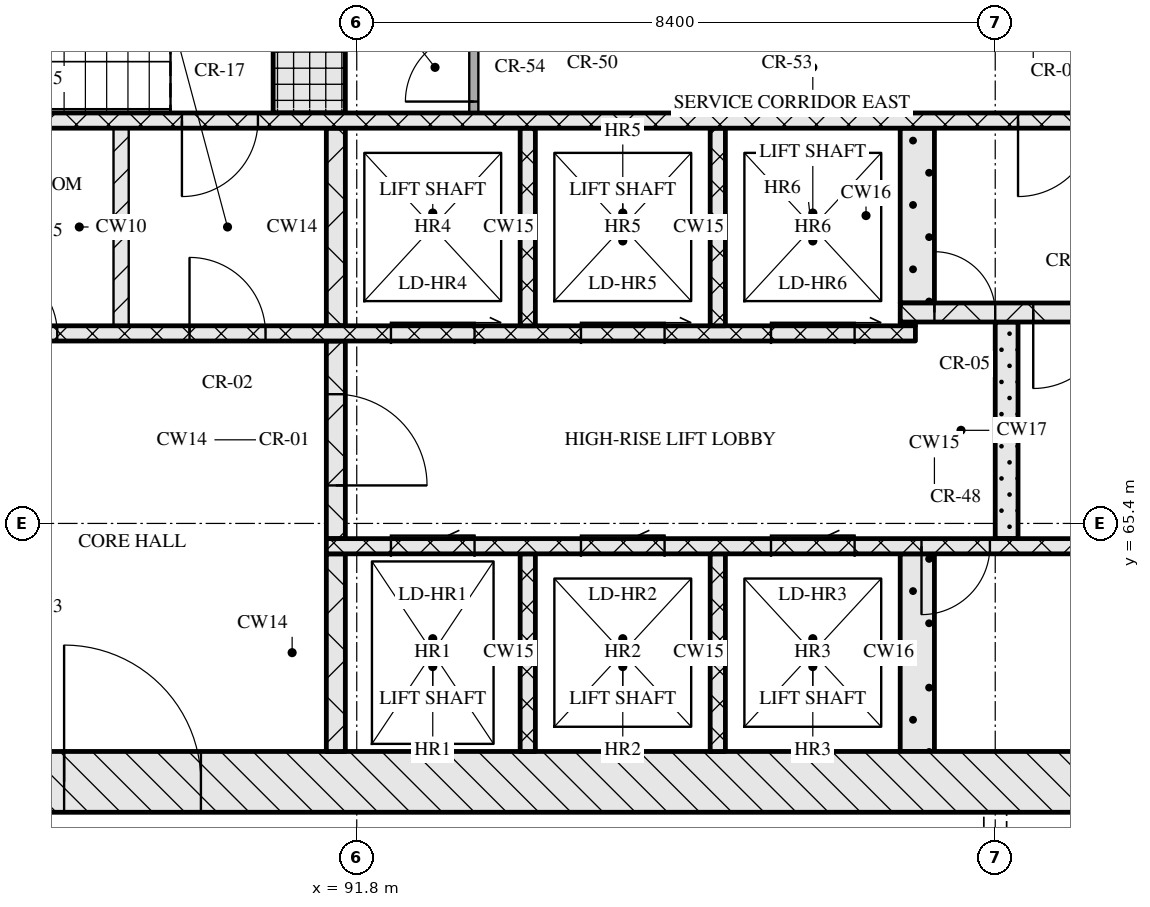
"""IFC4 building model, lengths in metres.
Left out: names, types, materials, properties, quantities, classifications, styles, units other than length and angle.
Written with IfcOpenShell. Run it as: python <this file> out.ifc"""

import sys

from ifc_helpers import new_model, si_unit, direction, frame, frame_2d, origin, place, context, subcontext, project, spatial, rectangle, extrude, element, fill, save


model = new_model("IFC4")
c1 = context("Model", 3, precision=1e-05, world=origin(), true_north=direction((0.0, 1.0)))
c2 = subcontext(c1, "Body", "Model", "MODEL_VIEW")
j1 = project(units=[si_unit("LENGTHUNIT", "METRE"), si_unit("PLANEANGLEUNIT", "RADIAN")], contexts=[c1])
p1 = place(None, origin())
s1 = spatial("IfcSite", under=j1, at=p1, CompositionType="ELEMENT")
p2 = place(p1, origin())
s2 = spatial("IfcBuilding", under=s1, at=p2, CompositionType="ELEMENT")
p3 = place(p2, frame((0.0, 0.0, 154.65)))
s3 = spatial("IfcBuildingStorey", under=s2, at=p3, CompositionType="ELEMENT", Elevation=154.65)
p4 = place(p3, frame((67.0, 62.0, 0.0), z_axis=(0.0, 0.0, 1.0), x_axis=(1.0, 0.0, 0.0)))
e1 = element("IfcWall", 1, at=p4, inside=s3, PredefinedType="SOLIDWALL", context=c2, shape_type="SweptSolid", body=[
    extrude(rectangle(XDim=41.2, YDim=0.8, at=frame_2d((20.6, 0.0))), origin(), (0.0, 0.0, 1.0), 3.32),
])
p5 = place(p4, frame((20.95, 0.0, 0.0)))
e2 = element("IfcOpeningElement", 2, at=p5, cuts=e1, PredefinedType="OPENING", context=c2, shape_type="SweptSolid", body=[
    extrude(rectangle(XDim=1.8, YDim=2.1, at=frame_2d((0.9, 1.05))), frame((0.0, 0.41, 0.0), z_axis=(0.0, -1.0, 0.0), x_axis=(1.0, 0.0, 0.0)), (0.0, 0.0, 1.0), 0.82),
])
p6 = place(p3, frame((91.525, 62.4, 0.0), z_axis=(0.0, 0.0, 1.0), x_axis=(0.0, 1.0, 0.0)))
e3 = element("IfcWall", 3, at=p6, inside=s3, PredefinedType="SOLIDWALL", context=c2, shape_type="SweptSolid", body=[
    extrude(rectangle(XDim=2.6, YDim=0.25, at=frame_2d((1.3, 0.0))), origin(), (0.0, 0.0, 1.0), 3.32),
])
for number, where, z_axis, x_axis in (
    (4, (94.05, 62.4, 0.0), (0.0, 0.0, 1.0), (0.0, 1.0, 0.0)),
    (5, (96.55, 62.4, 0.0), (0.0, 0.0, 1.0), (0.0, 1.0, 0.0)),
):
    element("IfcWall", number, at=place(p3, frame(where, z_axis=z_axis, x_axis=x_axis)), inside=s3, PredefinedType="SOLIDWALL", context=c2, shape_type="SweptSolid", body=[
        extrude(rectangle(XDim=2.6, YDim=0.2, at=frame_2d((1.3, 0.0))), origin(), (0.0, 0.0, 1.0), 3.32),
    ])
p7 = place(p3, frame((99.175, 62.4, 0.0), z_axis=(0.0, 0.0, 1.0), x_axis=(0.0, 1.0, 0.0)))
e6 = element("IfcWall", 6, at=p7, inside=s3, PredefinedType="SOLIDWALL", context=c2, shape_type="SweptSolid", body=[
    extrude(rectangle(XDim=2.6, YDim=0.45, at=frame_2d((1.3, 0.0))), origin(), (0.0, 0.0, 1.0), 3.32),
])
p8 = place(p3, frame((91.4, 65.1, 0.0), z_axis=(0.0, 0.0, 1.0), x_axis=(1.0, 0.0, 0.0)))
e7 = element("IfcWall", 7, at=p8, inside=s3, PredefinedType="SOLIDWALL", context=c2, shape_type="SweptSolid", body=[
    extrude(rectangle(XDim=16.0, YDim=0.2, at=frame_2d((8.0, 0.0))), origin(), (0.0, 0.0, 1.0), 3.32),
])
p9 = place(p8, frame((0.85, 0.0, 0.0)))
e8 = element("IfcOpeningElement", 8, at=p9, cuts=e7, PredefinedType="OPENING", context=c2, shape_type="SweptSolid", body=[
    extrude(rectangle(XDim=1.1, YDim=2.1, at=frame_2d((0.55, 1.05))), frame((0.0, 0.11, 0.0), z_axis=(0.0, -1.0, 0.0), x_axis=(1.0, 0.0, 0.0)), (0.0, 0.0, 1.0), 0.22),
])
p10 = place(p8, frame((3.35, 0.0, 0.0)))
e9 = element("IfcOpeningElement", 9, at=p10, cuts=e7, PredefinedType="OPENING", context=c2, shape_type="SweptSolid", body=[
    extrude(rectangle(XDim=1.1, YDim=2.1, at=frame_2d((0.55, 1.05))), frame((0.0, 0.11, 0.0), z_axis=(0.0, -1.0, 0.0), x_axis=(1.0, 0.0, 0.0)), (0.0, 0.0, 1.0), 0.22),
])
p11 = place(p8, frame((5.85, 0.0, 0.0)))
e10 = element("IfcOpeningElement", 10, at=p11, cuts=e7, PredefinedType="OPENING", context=c2, shape_type="SweptSolid", body=[
    extrude(rectangle(XDim=1.1, YDim=2.1, at=frame_2d((0.55, 1.05))), frame((0.0, 0.11, 0.0), z_axis=(0.0, -1.0, 0.0), x_axis=(1.0, 0.0, 0.0)), (0.0, 0.0, 1.0), 0.22),
])
p12 = place(p8, frame((7.83, 0.0, 0.0)))
e11 = element("IfcOpeningElement", 11, at=p12, cuts=e7, PredefinedType="OPENING", context=c2, shape_type="SweptSolid", body=[
    extrude(rectangle(XDim=0.9, YDim=2.1, at=frame_2d((0.45, 1.05))), frame((0.0, 0.11, 0.0), z_axis=(0.0, -1.0, 0.0), x_axis=(1.0, 0.0, 0.0)), (0.0, 0.0, 1.0), 0.22),
])
p13 = place(p3, frame((91.525, 65.2, 0.0), z_axis=(0.0, 0.0, 1.0), x_axis=(0.0, 1.0, 0.0)))
e12 = element("IfcWall", 12, at=p13, inside=s3, PredefinedType="SOLIDWALL", context=c2, shape_type="SweptSolid", body=[
    extrude(rectangle(XDim=2.6, YDim=0.25, at=frame_2d((1.3, 0.0))), origin(), (0.0, 0.0, 1.0), 3.32),
])
p14 = place(p13, frame((0.7, 0.0, 0.0)))
e13 = element("IfcOpeningElement", 13, at=p14, cuts=e12, PredefinedType="OPENING", context=c2, shape_type="SweptSolid", body=[
    extrude(rectangle(XDim=1.2, YDim=2.1, at=frame_2d((0.6, 1.05))), frame((0.0, 0.135, 0.0), z_axis=(0.0, -1.0, 0.0), x_axis=(1.0, 0.0, 0.0)), (0.0, 0.0, 1.0), 0.27),
])
p15 = place(p3, frame((100.35, 65.2, 0.0), z_axis=(0.0, 0.0, 1.0), x_axis=(0.0, 1.0, 0.0)))
e14 = element("IfcWall", 14, at=p15, inside=s3, PredefinedType="SOLIDWALL", context=c2, shape_type="SweptSolid", body=[
    extrude(rectangle(XDim=2.85, YDim=0.3, at=frame_2d((1.425, 0.0))), origin(), (0.0, 0.0, 1.0), 3.32),
])
p16 = place(p3, frame((76.05, 67.9, 0.0), z_axis=(0.0, 0.0, 1.0), x_axis=(1.0, 0.0, 0.0)))
e15 = element("IfcWall", 15, at=p16, inside=s3, PredefinedType="SOLIDWALL", context=c2, shape_type="SweptSolid", body=[
    extrude(rectangle(XDim=23.1, YDim=0.2, at=frame_2d((11.55, 0.0))), origin(), (0.0, 0.0, 1.0), 3.32),
])
p17 = place(p16, frame((1.4, 0.0, 0.0)))
e16 = element("IfcOpeningElement", 16, at=p17, cuts=e15, PredefinedType="OPENING", context=c2, shape_type="SweptSolid", body=[
    extrude(rectangle(XDim=0.9, YDim=2.1, at=frame_2d((0.45, 1.05))), frame((0.0, 0.11, 0.0), z_axis=(0.0, -1.0, 0.0), x_axis=(1.0, 0.0, 0.0)), (0.0, 0.0, 1.0), 0.22),
])
p18 = place(p16, frame((5.11, 0.0, 0.0)))
e17 = element("IfcOpeningElement", 17, at=p18, cuts=e15, PredefinedType="OPENING", context=c2, shape_type="SweptSolid", body=[
    extrude(rectangle(XDim=0.9, YDim=2.1, at=frame_2d((0.45, 1.05))), frame((0.0, 0.11, 0.0), z_axis=(0.0, -1.0, 0.0), x_axis=(1.0, 0.0, 0.0)), (0.0, 0.0, 1.0), 0.22),
])
p19 = place(p16, frame((8.45, 0.0, 0.0)))
e18 = element("IfcOpeningElement", 18, at=p19, cuts=e15, PredefinedType="OPENING", context=c2, shape_type="SweptSolid", body=[
    extrude(rectangle(XDim=0.9, YDim=2.1, at=frame_2d((0.45, 1.05))), frame((0.0, 0.11, 0.0), z_axis=(0.0, -1.0, 0.0), x_axis=(1.0, 0.0, 0.0)), (0.0, 0.0, 1.0), 0.22),
])
p20 = place(p16, frame((10.91, 0.0, 0.0)))
e19 = element("IfcOpeningElement", 19, at=p20, cuts=e15, PredefinedType="OPENING", context=c2, shape_type="SweptSolid", body=[
    extrude(rectangle(XDim=0.9, YDim=2.1, at=frame_2d((0.45, 1.05))), frame((0.0, 0.11, 0.0), z_axis=(0.0, -1.0, 0.0), x_axis=(1.0, 0.0, 0.0)), (0.0, 0.0, 1.0), 0.22),
])
p21 = place(p16, frame((13.55, 0.0, 0.0)))
e20 = element("IfcOpeningElement", 20, at=p21, cuts=e15, PredefinedType="OPENING", context=c2, shape_type="SweptSolid", body=[
    extrude(rectangle(XDim=1.0, YDim=2.1, at=frame_2d((0.5, 1.05))), frame((0.0, 0.11, 0.0), z_axis=(0.0, -1.0, 0.0), x_axis=(1.0, 0.0, 0.0)), (0.0, 0.0, 1.0), 0.22),
])
p22 = place(p16, frame((16.2, 0.0, 0.0)))
e21 = element("IfcOpeningElement", 21, at=p22, cuts=e15, PredefinedType="OPENING", context=c2, shape_type="SweptSolid", body=[
    extrude(rectangle(XDim=1.1, YDim=2.1, at=frame_2d((0.55, 1.05))), frame((0.0, 0.11, 0.0), z_axis=(0.0, -1.0, 0.0), x_axis=(1.0, 0.0, 0.0)), (0.0, 0.0, 1.0), 0.22),
])
p23 = place(p16, frame((18.7, 0.0, 0.0)))
e22 = element("IfcOpeningElement", 22, at=p23, cuts=e15, PredefinedType="OPENING", context=c2, shape_type="SweptSolid", body=[
    extrude(rectangle(XDim=1.1, YDim=2.1, at=frame_2d((0.55, 1.05))), frame((0.0, 0.11, 0.0), z_axis=(0.0, -1.0, 0.0), x_axis=(1.0, 0.0, 0.0)), (0.0, 0.0, 1.0), 0.22),
])
p24 = place(p16, frame((21.2, 0.0, 0.0)))
e23 = element("IfcOpeningElement", 23, at=p24, cuts=e15, PredefinedType="OPENING", context=c2, shape_type="SweptSolid", body=[
    extrude(rectangle(XDim=1.1, YDim=2.1, at=frame_2d((0.55, 1.05))), frame((0.0, 0.11, 0.0), z_axis=(0.0, -1.0, 0.0), x_axis=(1.0, 0.0, 0.0)), (0.0, 0.0, 1.0), 0.22),
])
p25 = place(p3, frame((88.7, 68.0, 0.0), z_axis=(0.0, 0.0, 1.0), x_axis=(0.0, 1.0, 0.0)))
e24 = element("IfcWall", 24, at=p25, inside=s3, PredefinedType="PARTITIONING", context=c2, shape_type="SweptSolid", body=[
    extrude(rectangle(XDim=2.6, YDim=0.2, at=frame_2d((1.3, 0.0))), origin(), (0.0, 0.0, 1.0), 3.32),
])
p26 = place(p3, frame((91.525, 68.0, 0.0), z_axis=(0.0, 0.0, 1.0), x_axis=(0.0, 1.0, 0.0)))
e25 = element("IfcWall", 25, at=p26, inside=s3, PredefinedType="SOLIDWALL", context=c2, shape_type="SweptSolid", body=[
    extrude(rectangle(XDim=2.6, YDim=0.25, at=frame_2d((1.3, 0.0))), origin(), (0.0, 0.0, 1.0), 3.32),
])
for number, where, z_axis, x_axis in (
    (26, (94.05, 68.0, 0.0), (0.0, 0.0, 1.0), (0.0, 1.0, 0.0)),
    (27, (96.55, 68.0, 0.0), (0.0, 0.0, 1.0), (0.0, 1.0, 0.0)),
):
    element("IfcWall", number, at=place(p3, frame(where, z_axis=z_axis, x_axis=x_axis)), inside=s3, PredefinedType="SOLIDWALL", context=c2, shape_type="SweptSolid", body=[
        extrude(rectangle(XDim=2.6, YDim=0.2, at=frame_2d((1.3, 0.0))), origin(), (0.0, 0.0, 1.0), 3.32),
    ])
p27 = place(p3, frame((98.95, 68.025, 0.0), z_axis=(0.0, 0.0, 1.0), x_axis=(1.0, 0.0, 0.0)))
e28 = element("IfcWall", 28, at=p27, inside=s3, PredefinedType="SOLIDWALL", context=c2, shape_type="SweptSolid", body=[
    extrude(rectangle(XDim=0.2, YDim=0.05, at=frame_2d((0.1, 0.0))), origin(), (0.0, 0.0, 1.0), 3.32),
])
p28 = place(p3, frame((98.95, 68.175, 0.0), z_axis=(0.0, 0.0, 1.0), x_axis=(1.0, 0.0, 0.0)))
e29 = element("IfcWall", 29, at=p28, inside=s3, PredefinedType="SOLIDWALL", context=c2, shape_type="SweptSolid", body=[
    extrude(rectangle(XDim=8.45, YDim=0.25, at=frame_2d((4.225, 0.0))), origin(), (0.0, 0.0, 1.0), 3.32),
])
p29 = place(p28, frame((0.45, 0.0, 0.0)))
e30 = element("IfcOpeningElement", 30, at=p29, cuts=e29, PredefinedType="OPENING", context=c2, shape_type="SweptSolid", body=[
    extrude(rectangle(XDim=0.8, YDim=2.1, at=frame_2d((0.4, 1.05))), frame((0.0, 0.135, 0.0), z_axis=(0.0, -1.0, 0.0), x_axis=(1.0, 0.0, 0.0)), (0.0, 0.0, 1.0), 0.27),
])
p30 = place(p28, frame((1.75, 0.0, 0.0)))
e31 = element("IfcOpeningElement", 31, at=p30, cuts=e29, PredefinedType="OPENING", context=c2, shape_type="SweptSolid", body=[
    extrude(rectangle(XDim=1.0, YDim=2.1, at=frame_2d((0.5, 1.05))), frame((0.0, 0.135, 0.0), z_axis=(0.0, -1.0, 0.0), x_axis=(1.0, 0.0, 0.0)), (0.0, 0.0, 1.0), 0.27),
])
p31 = place(p3, frame((99.175, 68.3, 0.0), z_axis=(0.0, 0.0, 1.0), x_axis=(0.0, 1.0, 0.0)))
e32 = element("IfcWall", 32, at=p31, inside=s3, PredefinedType="SOLIDWALL", context=c2, shape_type="SweptSolid", body=[
    extrude(rectangle(XDim=2.3, YDim=0.45, at=frame_2d((1.15, 0.0))), origin(), (0.0, 0.0, 1.0), 3.32),
])
p32 = place(p3, frame((67.8, 70.7, 0.0), z_axis=(0.0, 0.0, 1.0), x_axis=(1.0, 0.0, 0.0)))
e33 = element("IfcWall", 33, at=p32, inside=s3, PredefinedType="SOLIDWALL", context=c2, shape_type="SweptSolid", body=[
    extrude(rectangle(XDim=39.6, YDim=0.2, at=frame_2d((19.8, 0.0))), origin(), (0.0, 0.0, 1.0), 3.32),
])
p33 = place(p32, frame((0.65, 0.0, 0.0)))
e34 = element("IfcOpeningElement", 34, at=p33, cuts=e33, PredefinedType="OPENING", context=c2, shape_type="SweptSolid", body=[
    extrude(rectangle(XDim=1.1, YDim=2.1, at=frame_2d((0.55, 1.05))), frame((0.0, 0.11, 0.0), z_axis=(0.0, -1.0, 0.0), x_axis=(1.0, 0.0, 0.0)), (0.0, 0.0, 1.0), 0.22),
])
p34 = place(p32, frame((3.25, 0.0, 0.0)))
e35 = element("IfcOpeningElement", 35, at=p34, cuts=e33, PredefinedType="OPENING", context=c2, shape_type="SweptSolid", body=[
    extrude(rectangle(XDim=1.1, YDim=2.1, at=frame_2d((0.55, 1.05))), frame((0.0, 0.11, 0.0), z_axis=(0.0, -1.0, 0.0), x_axis=(1.0, 0.0, 0.0)), (0.0, 0.0, 1.0), 0.22),
])
p35 = place(p32, frame((5.9, 0.0, 0.0)))
e36 = element("IfcOpeningElement", 36, at=p35, cuts=e33, PredefinedType="OPENING", context=c2, shape_type="SweptSolid", body=[
    extrude(rectangle(XDim=1.0, YDim=2.1, at=frame_2d((0.5, 1.05))), frame((0.0, 0.11, 0.0), z_axis=(0.0, -1.0, 0.0), x_axis=(1.0, 0.0, 0.0)), (0.0, 0.0, 1.0), 0.22),
])
p36 = place(p32, frame((21.7, 0.0, 0.0)))
e37 = element("IfcOpeningElement", 37, at=p36, cuts=e33, PredefinedType="OPENING", context=c2, shape_type="SweptSolid", body=[
    extrude(rectangle(XDim=1.0, YDim=2.1, at=frame_2d((0.5, 1.05))), frame((0.0, 0.11, 0.0), z_axis=(0.0, -1.0, 0.0), x_axis=(1.0, 0.0, 0.0)), (0.0, 0.0, 1.0), 0.22),
])
p37 = place(p32, frame((32.7, 0.0, 0.0)))
e38 = element("IfcOpeningElement", 38, at=p37, cuts=e33, PredefinedType="OPENING", context=c2, shape_type="SweptSolid", body=[
    extrude(rectangle(XDim=1.0, YDim=2.1, at=frame_2d((0.5, 1.05))), frame((0.0, 0.11, 0.0), z_axis=(0.0, -1.0, 0.0), x_axis=(1.0, 0.0, 0.0)), (0.0, 0.0, 1.0), 0.22),
])
p38 = place(p32, frame((35.25, 0.0, 0.0)))
e39 = element("IfcOpeningElement", 39, at=p38, cuts=e33, PredefinedType="OPENING", context=c2, shape_type="SweptSolid", body=[
    extrude(rectangle(XDim=1.1, YDim=2.1, at=frame_2d((0.55, 1.05))), frame((0.0, 0.11, 0.0), z_axis=(0.0, -1.0, 0.0), x_axis=(1.0, 0.0, 0.0)), (0.0, 0.0, 1.0), 0.22),
])
p39 = place(p32, frame((37.85, 0.0, 0.0)))
e40 = element("IfcOpeningElement", 40, at=p39, cuts=e33, PredefinedType="OPENING", context=c2, shape_type="SweptSolid", body=[
    extrude(rectangle(XDim=1.1, YDim=2.1, at=frame_2d((0.55, 1.05))), frame((0.0, 0.11, 0.0), z_axis=(0.0, -1.0, 0.0), x_axis=(1.0, 0.0, 0.0)), (0.0, 0.0, 1.0), 0.22),
])
p40 = place(p3, frame((91.175, 70.8, 0.0), z_axis=(0.0, 0.0, 1.0), x_axis=(0.0, 1.0, 0.0)))
e41 = element("IfcWall", 41, at=p40, inside=s3, PredefinedType="SOLIDWALL", context=c2, shape_type="SweptSolid", body=[
    extrude(rectangle(XDim=2.95, YDim=0.95, at=frame_2d((1.475, 0.0))), origin(), (0.0, 0.0, 1.0), 3.32),
])
p41 = place(p3, frame((93.34, 70.8, 0.0), z_axis=(0.0, 0.0, 1.0), x_axis=(0.0, 1.0, 0.0)))
e42 = element("IfcWall", 42, at=p41, inside=s3, PredefinedType="PARTITIONING", context=c2, shape_type="SweptSolid", body=[
    extrude(rectangle(XDim=1.2, YDim=0.12, at=frame_2d((0.6, 0.0))), origin(), (0.0, 0.0, 1.0), 3.32),
])
p42 = place(p41, frame((0.15, 0.0, 0.0)))
e43 = element("IfcOpeningElement", 43, at=p42, cuts=e42, PredefinedType="OPENING", context=c2, shape_type="SweptSolid", body=[
    extrude(rectangle(XDim=0.9, YDim=2.1, at=frame_2d((0.45, 1.05))), frame((0.0, 0.07, 0.0), z_axis=(0.0, -1.0, 0.0), x_axis=(1.0, 0.0, 0.0)), (0.0, 0.0, 1.0), 0.14),
])
p43 = place(p5, origin())
e44 = element("IfcDoor", 44, at=p43, inside=s3, OperationType="DOUBLE_DOOR_SINGLE_SWING", PredefinedType="DOOR", context=c2, shape_type="SweptSolid", body=[
    extrude(rectangle(XDim=1.8, YDim=2.1, at=frame_2d((0.9, 1.05))), frame((0.0, 0.025, 0.0), z_axis=(0.0, -1.0, 0.0), x_axis=(1.0, 0.0, 0.0)), (0.0, 0.0, 1.0), 0.05),
])
fill(e2, e44)
p44 = place(p9, origin())
e45 = element("IfcDoor", 45, at=p44, inside=s3, OperationType="SLIDING_TO_LEFT", PredefinedType="DOOR", context=c2, shape_type="SweptSolid", body=[
    extrude(rectangle(XDim=1.1, YDim=2.1, at=frame_2d((0.55, 1.05))), frame((0.0, 0.025, 0.0), z_axis=(0.0, -1.0, 0.0), x_axis=(1.0, 0.0, 0.0)), (0.0, 0.0, 1.0), 0.05),
])
fill(e8, e45)
p45 = place(p10, origin())
e46 = element("IfcDoor", 46, at=p45, inside=s3, OperationType="SLIDING_TO_LEFT", PredefinedType="DOOR", context=c2, shape_type="SweptSolid", body=[
    extrude(rectangle(XDim=1.1, YDim=2.1, at=frame_2d((0.55, 1.05))), frame((0.0, 0.025, 0.0), z_axis=(0.0, -1.0, 0.0), x_axis=(1.0, 0.0, 0.0)), (0.0, 0.0, 1.0), 0.05),
])
fill(e9, e46)
p46 = place(p11, origin())
e47 = element("IfcDoor", 47, at=p46, inside=s3, OperationType="SLIDING_TO_LEFT", PredefinedType="DOOR", context=c2, shape_type="SweptSolid", body=[
    extrude(rectangle(XDim=1.1, YDim=2.1, at=frame_2d((0.55, 1.05))), frame((0.0, 0.025, 0.0), z_axis=(0.0, -1.0, 0.0), x_axis=(1.0, 0.0, 0.0)), (0.0, 0.0, 1.0), 0.05),
])
fill(e10, e47)
p47 = place(p12, origin())
e48 = element("IfcDoor", 48, at=p47, inside=s3, OperationType="SINGLE_SWING_RIGHT", PredefinedType="DOOR", context=c2, shape_type="SweptSolid", body=[
    extrude(rectangle(XDim=0.9, YDim=2.1, at=frame_2d((0.45, 1.05))), frame((0.0, 0.025, 0.0), z_axis=(0.0, -1.0, 0.0), x_axis=(1.0, 0.0, 0.0)), (0.0, 0.0, 1.0), 0.05),
])
fill(e11, e48)
p48 = place(p14, origin())
e49 = element("IfcDoor", 49, at=p48, inside=s3, OperationType="SINGLE_SWING_RIGHT", PredefinedType="DOOR", context=c2, shape_type="SweptSolid", body=[
    extrude(rectangle(XDim=1.2, YDim=2.1, at=frame_2d((0.6, 1.05))), frame((0.0, 0.025, 0.0), z_axis=(0.0, -1.0, 0.0), x_axis=(1.0, 0.0, 0.0)), (0.0, 0.0, 1.0), 0.05),
])
fill(e13, e49)
p49 = place(p20, origin())
e50 = element("IfcDoor", 50, at=p49, inside=s3, OperationType="SINGLE_SWING_LEFT", PredefinedType="DOOR", context=c2, shape_type="SweptSolid", body=[
    extrude(rectangle(XDim=0.9, YDim=2.1, at=frame_2d((0.45, 1.05))), frame((0.0, 0.025, 0.0), z_axis=(0.0, -1.0, 0.0), x_axis=(1.0, 0.0, 0.0)), (0.0, 0.0, 1.0), 0.05),
])
fill(e19, e50)
p50 = place(p21, origin())
e51 = element("IfcDoor", 51, at=p50, inside=s3, OperationType="SINGLE_SWING_LEFT", PredefinedType="DOOR", context=c2, shape_type="SweptSolid", body=[
    extrude(rectangle(XDim=1.0, YDim=2.1, at=frame_2d((0.5, 1.05))), frame((0.0, 0.025, 0.0), z_axis=(0.0, -1.0, 0.0), x_axis=(1.0, 0.0, 0.0)), (0.0, 0.0, 1.0), 0.05),
])
fill(e20, e51)
p51 = place(p22, origin())
e52 = element("IfcDoor", 52, at=p51, inside=s3, OperationType="SLIDING_TO_RIGHT", PredefinedType="DOOR", context=c2, shape_type="SweptSolid", body=[
    extrude(rectangle(XDim=1.1, YDim=2.1, at=frame_2d((0.55, 1.05))), frame((0.0, 0.025, 0.0), z_axis=(0.0, -1.0, 0.0), x_axis=(1.0, 0.0, 0.0)), (0.0, 0.0, 1.0), 0.05),
])
fill(e21, e52)
p52 = place(p23, origin())
e53 = element("IfcDoor", 53, at=p52, inside=s3, OperationType="SLIDING_TO_RIGHT", PredefinedType="DOOR", context=c2, shape_type="SweptSolid", body=[
    extrude(rectangle(XDim=1.1, YDim=2.1, at=frame_2d((0.55, 1.05))), frame((0.0, 0.025, 0.0), z_axis=(0.0, -1.0, 0.0), x_axis=(1.0, 0.0, 0.0)), (0.0, 0.0, 1.0), 0.05),
])
fill(e22, e53)
p53 = place(p24, origin())
e54 = element("IfcDoor", 54, at=p53, inside=s3, OperationType="SLIDING_TO_RIGHT", PredefinedType="DOOR", context=c2, shape_type="SweptSolid", body=[
    extrude(rectangle(XDim=1.1, YDim=2.1, at=frame_2d((0.55, 1.05))), frame((0.0, 0.025, 0.0), z_axis=(0.0, -1.0, 0.0), x_axis=(1.0, 0.0, 0.0)), (0.0, 0.0, 1.0), 0.05),
])
fill(e23, e54)
p54 = place(p29, origin())
e55 = element("IfcDoor", 55, at=p54, inside=s3, OperationType="SINGLE_SWING_LEFT", PredefinedType="DOOR", context=c2, shape_type="SweptSolid", body=[
    extrude(rectangle(XDim=0.8, YDim=2.1, at=frame_2d((0.4, 1.05))), frame((0.0, 0.025, 0.0), z_axis=(0.0, -1.0, 0.0), x_axis=(1.0, 0.0, 0.0)), (0.0, 0.0, 1.0), 0.05),
])
fill(e30, e55)
p55 = place(p30, origin())
e56 = element("IfcDoor", 56, at=p55, inside=s3, OperationType="SINGLE_SWING_RIGHT", PredefinedType="DOOR", context=c2, shape_type="SweptSolid", body=[
    extrude(rectangle(XDim=1.0, YDim=2.1, at=frame_2d((0.5, 1.05))), frame((0.0, 0.025, 0.0), z_axis=(0.0, -1.0, 0.0), x_axis=(1.0, 0.0, 0.0)), (0.0, 0.0, 1.0), 0.05),
])
fill(e31, e56)
p56 = place(p36, origin())
e57 = element("IfcDoor", 57, at=p56, inside=s3, OperationType="SINGLE_SWING_RIGHT", PredefinedType="DOOR", context=c2, shape_type="SweptSolid", body=[
    extrude(rectangle(XDim=1.0, YDim=2.1, at=frame_2d((0.5, 1.05))), frame((0.0, 0.025, 0.0), z_axis=(0.0, -1.0, 0.0), x_axis=(1.0, 0.0, 0.0)), (0.0, 0.0, 1.0), 0.05),
])
fill(e37, e57)
p57 = place(p37, origin())
e58 = element("IfcDoor", 58, at=p57, inside=s3, OperationType="SINGLE_SWING_RIGHT", PredefinedType="DOOR", context=c2, shape_type="SweptSolid", body=[
    extrude(rectangle(XDim=1.0, YDim=2.1, at=frame_2d((0.5, 1.05))), frame((0.0, 0.025, 0.0), z_axis=(0.0, -1.0, 0.0), x_axis=(1.0, 0.0, 0.0)), (0.0, 0.0, 1.0), 0.05),
])
fill(e38, e58)
p58 = place(p42, origin())
e59 = element("IfcDoor", 59, at=p58, inside=s3, OperationType="SINGLE_SWING_LEFT", PredefinedType="DOOR", context=c2, shape_type="SweptSolid", body=[
    extrude(rectangle(XDim=0.9, YDim=2.1, at=frame_2d((0.45, 1.05))), frame((0.0, 0.025, 0.0), z_axis=(0.0, -1.0, 0.0), x_axis=(1.0, 0.0, 0.0)), (0.0, 0.0, 1.0), 0.05),
])
fill(e43, e59)
save(model, sys.argv[1])
